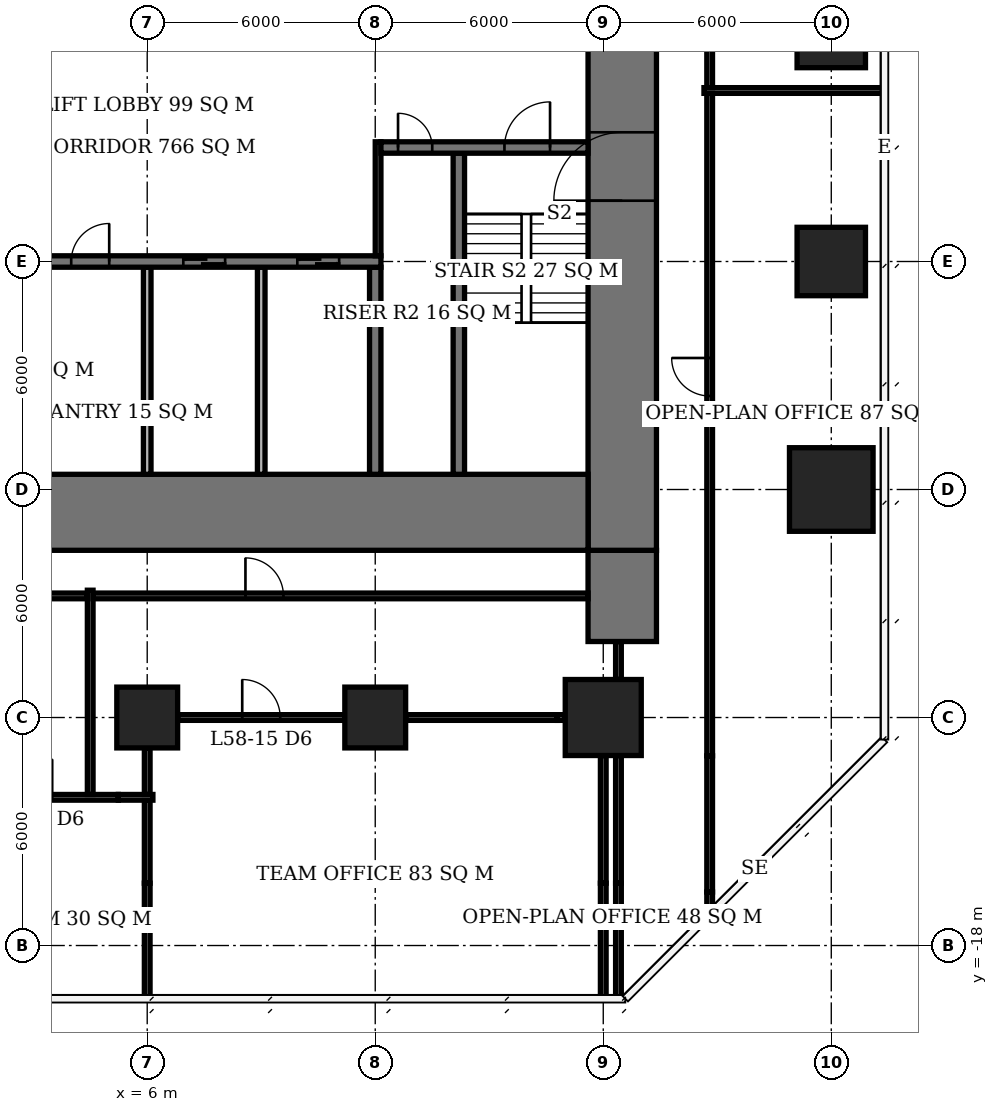
"""IFC4 building model, lengths in metres.
Left out: names, types, materials, properties, quantities, classifications, styles, units other than length and angle.
Written with IfcOpenShell. Run it as: python <this file> out.ifc"""

import sys

from ifc_helpers import new_model, si_unit, direction, frame, frame_2d, origin, origin_2d, place, context, subcontext, project, spatial, rectangle, extrude, element, fill, save


model = new_model("IFC4")
c1 = context("Model", 3, precision=1e-05, world=origin(), true_north=direction((0.0, 1.0)))
c2 = subcontext(c1, "Body", "Model", "MODEL_VIEW")
j1 = project(units=[si_unit("LENGTHUNIT", "METRE"), si_unit("PLANEANGLEUNIT", "RADIAN")], contexts=[c1])
p1 = place(None, origin())
s1 = spatial("IfcSite", under=j1, at=p1, CompositionType="ELEMENT")
p2 = place(p1, origin())
s2 = spatial("IfcBuilding", under=s1, at=p2, CompositionType="ELEMENT")
p3 = place(p2, frame((0.0, 0.0, 235.7)))
s3 = spatial("IfcBuildingStorey", under=s2, at=p3, CompositionType="ELEMENT", Elevation=235.7)
for number, where, z_axis, x_axis in (
    (1, (6.0, -12.0, 0.0), (0.0, 0.0, 1.0), (1.0, 0.0, 0.0)),
    (2, (12.0, -12.0, 0.0), (0.0, 0.0, 1.0), (1.0, 0.0, 0.0)),
):
    element("IfcColumn", number, at=place(p3, frame(where, z_axis=z_axis, x_axis=x_axis)), inside=s3, PredefinedType="COLUMN", context=c2, shape_type="SweptSolid", body=[
        extrude(rectangle(XDim=1.6, YDim=1.6, at=origin_2d()), origin(), (0.0, 0.0, 1.0), 3.9),
    ])
p4 = place(p3, frame((18.0, -12.0, 0.0), z_axis=(0.0, 0.0, 1.0), x_axis=(1.0, 0.0, 0.0)))
e3 = element("IfcColumn", 3, at=p4, inside=s3, PredefinedType="COLUMN", context=c2, shape_type="SweptSolid", body=[
    extrude(rectangle(XDim=2.0, YDim=2.0, at=origin_2d()), origin(), (0.0, 0.0, 1.0), 3.9),
])
p5 = place(p3, frame((24.0, -6.0, 0.0), z_axis=(0.0, 0.0, 1.0), x_axis=(1.0, 0.0, 0.0)))
e4 = element("IfcColumn", 4, at=p5, inside=s3, PredefinedType="COLUMN", context=c2, shape_type="SweptSolid", body=[
    extrude(rectangle(XDim=2.2, YDim=2.2, at=origin_2d()), origin(), (0.0, 0.0, 1.0), 3.9),
])
for number, where, z_axis, x_axis in (
    (5, (24.0, 0.0, 0.0), (0.0, 0.0, 1.0), (1.0, 0.0, 0.0)),
    (6, (24.0, 6.0, 0.0), (0.0, 0.0, 1.0), (1.0, 0.0, 0.0)),
):
    element("IfcColumn", number, at=place(p3, frame(where, z_axis=z_axis, x_axis=x_axis)), inside=s3, PredefinedType="COLUMN", context=c2, shape_type="SweptSolid", body=[
        extrude(rectangle(XDim=1.8, YDim=1.8, at=origin_2d()), origin(), (0.0, 0.0, 1.0), 3.9),
    ])
p6 = place(p3, frame((-5.6, -6.6, 0.0), z_axis=(0.0, 0.0, 1.0), x_axis=(1.0, 0.0, 0.0)))
e7 = element("IfcWall", 7, at=p6, inside=s3, PredefinedType="SHEAR", context=c2, shape_type="SweptSolid", body=[
    extrude(rectangle(XDim=23.2, YDim=2.0, at=frame_2d((11.6, 0.0))), origin(), (0.0, 0.0, 1.0), 3.9),
])
p7 = place(p3, frame((18.5, -7.6, 0.0), z_axis=(0.0, 0.0, 1.0), x_axis=(0.0, 1.0, 0.0)))
e8 = element("IfcWall", 8, at=p7, inside=s3, PredefinedType="SHEAR", context=c2, shape_type="SweptSolid", body=[
    extrude(rectangle(XDim=21.2, YDim=1.8, at=frame_2d((10.6, 0.0))), origin(), (0.0, 0.0, 1.0), 3.9),
])
p8 = place(p7, frame((9.2, 0.0, 0.0)))
e9 = element("IfcOpeningElement", 9, at=p8, cuts=e8, PredefinedType="OPENING", context=c2, shape_type="SweptSolid", body=[
    extrude(rectangle(XDim=1.8, YDim=2.4, at=frame_2d((0.9, 1.2))), frame((0.0, 0.91, 0.0), z_axis=(0.0, -1.0, 0.0), x_axis=(1.0, 0.0, 0.0)), (0.0, 0.0, 1.0), 1.82),
])
p9 = place(p3, frame((18.5, -10.0, 0.0), z_axis=(0.0, 0.0, 1.0), x_axis=(0.0, 1.0, 0.0)))
e10 = element("IfcWall", 10, at=p9, inside=s3, PredefinedType="SHEAR", context=c2, shape_type="SweptSolid", body=[
    extrude(rectangle(XDim=2.4, YDim=1.8, at=frame_2d((1.2, 0.0))), origin(), (0.0, 0.0, 1.0), 3.9),
])
p10 = place(p3, frame((-5.6, 0.0, 0.0), z_axis=(0.0, 0.0, 1.0), x_axis=(1.0, 0.0, 0.0)))
e11 = element("IfcWall", 11, at=p10, inside=s3, PredefinedType="SHEAR", context=c2, shape_type="SweptSolid", body=[
    extrude(rectangle(XDim=17.75, YDim=0.3, at=frame_2d((8.875, 0.0))), origin(), (0.0, 0.0, 1.0), 3.9),
])
p11 = place(p10, frame((0.6, 0.0, 0.0)))
e12 = element("IfcOpeningElement", 12, at=p11, cuts=e11, PredefinedType="OPENING", context=c2, shape_type="SweptSolid", body=[
    extrude(rectangle(XDim=0.9, YDim=2.1, at=frame_2d((0.45, 1.05))), frame((0.0, 0.16, 0.0), z_axis=(0.0, -1.0, 0.0), x_axis=(1.0, 0.0, 0.0)), (0.0, 0.0, 1.0), 0.32),
])
p12 = place(p10, frame((3.7, 0.0, 0.0)))
e13 = element("IfcOpeningElement", 13, at=p12, cuts=e11, PredefinedType="OPENING", context=c2, shape_type="SweptSolid", body=[
    extrude(rectangle(XDim=1.0, YDim=2.1, at=frame_2d((0.5, 1.05))), frame((0.0, 0.16, 0.0), z_axis=(0.0, -1.0, 0.0), x_axis=(1.0, 0.0, 0.0)), (0.0, 0.0, 1.0), 0.32),
])
p13 = place(p10, frame((9.6, 0.0, 0.0)))
e14 = element("IfcOpeningElement", 14, at=p13, cuts=e11, PredefinedType="OPENING", context=c2, shape_type="SweptSolid", body=[
    extrude(rectangle(XDim=1.0, YDim=2.1, at=frame_2d((0.5, 1.05))), frame((0.0, 0.16, 0.0), z_axis=(0.0, -1.0, 0.0), x_axis=(1.0, 0.0, 0.0)), (0.0, 0.0, 1.0), 0.32),
])
p14 = place(p10, frame((12.55, 0.0, 0.0)))
e15 = element("IfcOpeningElement", 15, at=p14, cuts=e11, PredefinedType="OPENING", context=c2, shape_type="SweptSolid", body=[
    extrude(rectangle(XDim=1.1, YDim=2.1, at=frame_2d((0.55, 1.05))), frame((0.0, 0.16, 0.0), z_axis=(0.0, -1.0, 0.0), x_axis=(1.0, 0.0, 0.0)), (0.0, 0.0, 1.0), 0.32),
])
p15 = place(p10, frame((15.55, 0.0, 0.0)))
e16 = element("IfcOpeningElement", 16, at=p15, cuts=e11, PredefinedType="OPENING", context=c2, shape_type="SweptSolid", body=[
    extrude(rectangle(XDim=1.1, YDim=2.1, at=frame_2d((0.55, 1.05))), frame((0.0, 0.16, 0.0), z_axis=(0.0, -1.0, 0.0), x_axis=(1.0, 0.0, 0.0)), (0.0, 0.0, 1.0), 0.32),
])
p16 = place(p3, frame((12.15, 3.0, 0.0), z_axis=(0.0, 0.0, 1.0), x_axis=(1.0, 0.0, 0.0)))
e17 = element("IfcWall", 17, at=p16, inside=s3, PredefinedType="SHEAR", context=c2, shape_type="SweptSolid", body=[
    extrude(rectangle(XDim=5.45, YDim=0.3, at=frame_2d((2.725, 0.0))), origin(), (0.0, 0.0, 1.0), 3.9),
])
p17 = place(p16, frame((3.25, 0.0, 0.0)))
e18 = element("IfcOpeningElement", 18, at=p17, cuts=e17, PredefinedType="OPENING", context=c2, shape_type="SweptSolid", body=[
    extrude(rectangle(XDim=1.2, YDim=2.1, at=frame_2d((0.6, 1.05))), frame((0.0, 0.16, 0.0), z_axis=(0.0, -1.0, 0.0), x_axis=(1.0, 0.0, 0.0)), (0.0, 0.0, 1.0), 0.32),
])
p18 = place(p16, frame((0.45, 0.0, 0.0)))
e19 = element("IfcOpeningElement", 19, at=p18, cuts=e17, PredefinedType="OPENING", context=c2, shape_type="SweptSolid", body=[
    extrude(rectangle(XDim=0.9, YDim=2.1, at=frame_2d((0.45, 1.05))), frame((0.0, 0.16, 0.0), z_axis=(0.0, -1.0, 0.0), x_axis=(1.0, 0.0, 0.0)), (0.0, 0.0, 1.0), 0.32),
])
p19 = place(p3, frame((12.0, -5.6, 0.0), z_axis=(0.0, 0.0, 1.0), x_axis=(0.0, 1.0, 0.0)))
e20 = element("IfcWall", 20, at=p19, inside=s3, PredefinedType="SHEAR", context=c2, shape_type="SweptSolid", body=[
    extrude(rectangle(XDim=5.45, YDim=0.3, at=frame_2d((2.725, 0.0))), origin(), (0.0, 0.0, 1.0), 3.9),
])
p20 = place(p3, frame((14.2, -5.6, 0.0), z_axis=(0.0, 0.0, 1.0), x_axis=(0.0, 1.0, 0.0)))
e21 = element("IfcWall", 21, at=p20, inside=s3, PredefinedType="SHEAR", context=c2, shape_type="SweptSolid", body=[
    extrude(rectangle(XDim=8.45, YDim=0.3, at=frame_2d((4.225, 0.0))), origin(), (0.0, 0.0, 1.0), 3.9),
])
for number, where, z_axis, x_axis in (
    (22, (6.0, -5.6, 0.0), (0.0, 0.0, 1.0), (0.0, 1.0, 0.0)),
    (23, (9.0, -5.6, 0.0), (0.0, 0.0, 1.0), (0.0, 1.0, 0.0)),
):
    element("IfcWall", number, at=place(p3, frame(where, z_axis=z_axis, x_axis=x_axis)), inside=s3, PredefinedType="SOLIDWALL", context=c2, shape_type="SweptSolid", body=[
        extrude(rectangle(XDim=5.45, YDim=0.2, at=frame_2d((2.725, 0.0))), origin(), (0.0, 0.0, 1.0), 3.9),
    ])
p21 = place(p3, frame((0.76, -14.1, 0.0), z_axis=(0.0, 0.0, 1.0), x_axis=(1.0, 0.0, 0.0)))
e24 = element("IfcWall", 24, at=p21, inside=s3, PredefinedType="PARTITIONING", context=c2, shape_type="SweptSolid", body=[
    extrude(rectangle(XDim=4.48, YDim=0.15, at=frame_2d((2.24, 0.0))), origin(), (0.0, 0.0, 1.0), 3.65),
])
p22 = place(p21, frame((1.74, 0.0, 0.0)))
e25 = element("IfcOpeningElement", 25, at=p22, cuts=e24, PredefinedType="OPENING", context=c2, shape_type="SweptSolid", body=[
    extrude(rectangle(XDim=1.0, YDim=2.1, at=frame_2d((0.5, 1.05))), frame((0.0, 0.085, 0.0), z_axis=(0.0, -1.0, 0.0), x_axis=(1.0, 0.0, 0.0)), (0.0, 0.0, 1.0), 0.17),
])
p23 = place(p3, frame((5.24, -14.1, 0.0), z_axis=(0.0, 0.0, 1.0), x_axis=(1.0, 0.0, 0.0)))
e26 = element("IfcWall", 26, at=p23, inside=s3, PredefinedType="PARTITIONING", context=c2, shape_type="SweptSolid", body=[
    extrude(rectangle(XDim=0.91, YDim=0.15, at=frame_2d((0.455, 0.0))), origin(), (0.0, 0.0, 1.0), 2.15),
])
p24 = place(p3, frame((6.8, -12.0, 0.0), z_axis=(0.0, 0.0, 1.0), x_axis=(1.0, 0.0, 0.0)))
e27 = element("IfcWall", 27, at=p24, inside=s3, PredefinedType="PARTITIONING", context=c2, shape_type="SweptSolid", body=[
    extrude(rectangle(XDim=4.4, YDim=0.15, at=frame_2d((2.2, 0.0))), origin(), (0.0, 0.0, 1.0), 3.65),
])
p25 = place(p24, frame((1.7, 0.0, 0.0)))
e28 = element("IfcOpeningElement", 28, at=p25, cuts=e27, PredefinedType="OPENING", context=c2, shape_type="SweptSolid", body=[
    extrude(rectangle(XDim=1.0, YDim=2.1, at=frame_2d((0.5, 1.05))), frame((0.0, 0.085, 0.0), z_axis=(0.0, -1.0, 0.0), x_axis=(1.0, 0.0, 0.0)), (0.0, 0.0, 1.0), 0.17),
])
p26 = place(p3, frame((12.8, -12.0, 0.0), z_axis=(0.0, 0.0, 1.0), x_axis=(1.0, 0.0, 0.0)))
e29 = element("IfcWall", 29, at=p26, inside=s3, PredefinedType="PARTITIONING", context=c2, shape_type="SweptSolid", body=[
    extrude(rectangle(XDim=3.99, YDim=0.15, at=frame_2d((1.995, 0.0))), origin(), (0.0, 0.0, 1.0), 3.65),
])
p27 = place(p3, frame((16.79, -12.0, 0.0), z_axis=(0.0, 0.0, 1.0), x_axis=(1.0, 0.0, 0.0)))
e30 = element("IfcWall", 30, at=p27, inside=s3, PredefinedType="PARTITIONING", context=c2, shape_type="SweptSolid", body=[
    extrude(rectangle(XDim=0.21, YDim=0.15, at=frame_2d((0.105, 0.0))), origin(), (0.0, 0.0, 1.0), 2.15),
])
p28 = place(p3, frame((6.0, -19.35, 0.0), z_axis=(0.0, 0.0, 1.0), x_axis=(0.0, 1.0, 0.0)))
e31 = element("IfcWall", 31, at=p28, inside=s3, PredefinedType="PARTITIONING", context=c2, shape_type="SweptSolid", body=[
    extrude(rectangle(XDim=2.99, YDim=0.15, at=frame_2d((1.495, 0.0))), origin(), (0.0, 0.0, 1.0), 3.65),
])
p29 = place(p3, frame((6.0, -16.36, 0.0), z_axis=(0.0, 0.0, 1.0), x_axis=(0.0, 1.0, 0.0)))
e32 = element("IfcWall", 32, at=p29, inside=s3, PredefinedType="PARTITIONING", context=c2, shape_type="SweptSolid", body=[
    extrude(rectangle(XDim=2.185, YDim=0.15, at=frame_2d((1.093, 0.0))), origin(), (0.0, 0.0, 1.0), 2.15),
])
p30 = place(p3, frame((6.0, -14.025, 0.0), z_axis=(0.0, 0.0, 1.0), x_axis=(0.0, 1.0, 0.0)))
e33 = element("IfcWall", 33, at=p30, inside=s3, PredefinedType="PARTITIONING", context=c2, shape_type="SweptSolid", body=[
    extrude(rectangle(XDim=1.225, YDim=0.15, at=frame_2d((0.612, 0.0))), origin(), (0.0, 0.0, 1.0), 2.15),
])
p31 = place(p3, frame((18.0, -19.4, 0.0), z_axis=(0.0, 0.0, 1.0), x_axis=(0.0, 1.0, 0.0)))
e34 = element("IfcWall", 34, at=p31, inside=s3, PredefinedType="PARTITIONING", context=c2, shape_type="SweptSolid", body=[
    extrude(rectangle(XDim=3.04, YDim=0.15, at=frame_2d((1.52, 0.0))), origin(), (0.0, 0.0, 1.0), 3.65),
])
p32 = place(p3, frame((18.0, -16.36, 0.0), z_axis=(0.0, 0.0, 1.0), x_axis=(0.0, 1.0, 0.0)))
e35 = element("IfcWall", 35, at=p32, inside=s3, PredefinedType="PARTITIONING", context=c2, shape_type="SweptSolid", body=[
    extrude(rectangle(XDim=3.36, YDim=0.15, at=frame_2d((1.68, 0.0))), origin(), (0.0, 0.0, 1.0), 2.15),
])
p33 = place(p3, frame((-5.6, -8.8, 0.0), z_axis=(0.0, 0.0, 1.0), x_axis=(1.0, 0.0, 0.0)))
e36 = element("IfcWall", 36, at=p33, inside=s3, PredefinedType="PARTITIONING", context=c2, shape_type="SweptSolid", body=[
    extrude(rectangle(XDim=10.025, YDim=0.15, at=frame_2d((5.013, 0.0))), origin(), (0.0, 0.0, 1.0), 3.65),
])
p34 = place(p33, frame((3.035, 0.0, 0.0)))
e37 = element("IfcOpeningElement", 37, at=p34, cuts=e36, PredefinedType="OPENING", context=c2, shape_type="SweptSolid", body=[
    extrude(rectangle(XDim=1.0, YDim=2.1, at=frame_2d((0.5, 1.05))), frame((0.0, 0.085, 0.0), z_axis=(0.0, -1.0, 0.0), x_axis=(1.0, 0.0, 0.0)), (0.0, 0.0, 1.0), 0.17),
])
p35 = place(p3, frame((4.5, -14.025, 0.0), z_axis=(0.0, 0.0, 1.0), x_axis=(0.0, 1.0, 0.0)))
e38 = element("IfcWall", 38, at=p35, inside=s3, PredefinedType="PARTITIONING", context=c2, shape_type="SweptSolid", body=[
    extrude(rectangle(XDim=5.375, YDim=0.15, at=frame_2d((2.688, 0.0))), origin(), (0.0, 0.0, 1.0), 3.65),
])
p36 = place(p3, frame((4.575, -8.8, 0.0), z_axis=(0.0, 0.0, 1.0), x_axis=(1.0, 0.0, 0.0)))
e39 = element("IfcWall", 39, at=p36, inside=s3, PredefinedType="PARTITIONING", context=c2, shape_type="SweptSolid", body=[
    extrude(rectangle(XDim=13.025, YDim=0.15, at=frame_2d((6.513, 0.0))), origin(), (0.0, 0.0, 1.0), 3.65),
])
p37 = place(p36, frame((4.01, 0.0, 0.0)))
e40 = element("IfcOpeningElement", 40, at=p37, cuts=e39, PredefinedType="OPENING", context=c2, shape_type="SweptSolid", body=[
    extrude(rectangle(XDim=1.0, YDim=2.1, at=frame_2d((0.5, 1.05))), frame((0.0, 0.085, 0.0), z_axis=(0.0, -1.0, 0.0), x_axis=(1.0, 0.0, 0.0)), (0.0, 0.0, 1.0), 0.17),
])
p38 = place(p3, frame((18.4, -19.4, 0.0), z_axis=(0.0, 0.0, 1.0), x_axis=(0.0, 1.0, 0.0)))
e41 = element("IfcWall", 41, at=p38, inside=s3, PredefinedType="PARTITIONING", context=c2, shape_type="SweptSolid", body=[
    extrude(rectangle(XDim=3.04, YDim=0.15, at=frame_2d((1.52, 0.0))), origin(), (0.0, 0.0, 1.0), 3.65),
])
p39 = place(p3, frame((18.4, -16.36, 0.0), z_axis=(0.0, 0.0, 1.0), x_axis=(0.0, 1.0, 0.0)))
e42 = element("IfcWall", 42, at=p39, inside=s3, PredefinedType="PARTITIONING", context=c2, shape_type="SweptSolid", body=[
    extrude(rectangle(XDim=3.36, YDim=0.15, at=frame_2d((1.68, 0.0))), origin(), (0.0, 0.0, 1.0), 2.15),
])
p40 = place(p3, frame((18.4, -11.0, 0.0), z_axis=(0.0, 0.0, 1.0), x_axis=(0.0, 1.0, 0.0)))
e43 = element("IfcWall", 43, at=p40, inside=s3, PredefinedType="PARTITIONING", context=c2, shape_type="SweptSolid", body=[
    extrude(rectangle(XDim=1.0, YDim=0.15, at=frame_2d((0.5, 0.0))), origin(), (0.0, 0.0, 1.0), 3.65),
])
p41 = place(p3, frame((20.8, -17.064, 0.0), z_axis=(0.0, 0.0, 1.0), x_axis=(0.0, 1.0, 0.0)))
e44 = element("IfcWall", 44, at=p41, inside=s3, PredefinedType="PARTITIONING", context=c2, shape_type="SweptSolid", body=[
    extrude(rectangle(XDim=0.472, YDim=0.15, at=frame_2d((0.236, 0.0))), origin(), (0.0, 0.0, 1.0), 3.65),
])
p42 = place(p3, frame((20.8, -16.592, 0.0), z_axis=(0.0, 0.0, 1.0), x_axis=(0.0, 1.0, 0.0)))
e45 = element("IfcWall", 45, at=p42, inside=s3, PredefinedType="PARTITIONING", context=c2, shape_type="SweptSolid", body=[
    extrude(rectangle(XDim=3.584, YDim=0.15, at=frame_2d((1.792, 0.0))), origin(), (0.0, 0.0, 1.0), 2.15),
])
p43 = place(p3, frame((20.8, -13.008, 0.0), z_axis=(0.0, 0.0, 1.0), x_axis=(0.0, 1.0, 0.0)))
e46 = element("IfcWall", 46, at=p43, inside=s3, PredefinedType="PARTITIONING", context=c2, shape_type="SweptSolid", body=[
    extrude(rectangle(XDim=17.433, YDim=0.15, at=frame_2d((8.716, 0.0))), origin(), (0.0, 0.0, 1.0), 3.65),
])
p44 = place(p43, frame((9.469, 0.0, 0.0)))
e47 = element("IfcOpeningElement", 47, at=p44, cuts=e46, PredefinedType="OPENING", context=c2, shape_type="SweptSolid", body=[
    extrude(rectangle(XDim=1.0, YDim=2.1, at=frame_2d((0.5, 1.05))), frame((0.0, 0.085, 0.0), z_axis=(0.0, -1.0, 0.0), x_axis=(1.0, 0.0, 0.0)), (0.0, 0.0, 1.0), 0.17),
])
p45 = place(p3, frame((20.8, 4.575, 0.0), z_axis=(0.0, 0.0, 1.0), x_axis=(0.0, 1.0, 0.0)))
e48 = element("IfcWall", 48, at=p45, inside=s3, PredefinedType="PARTITIONING", context=c2, shape_type="SweptSolid", body=[
    extrude(rectangle(XDim=18.489, YDim=0.15, at=frame_2d((9.245, 0.0))), origin(), (0.0, 0.0, 1.0), 3.65),
])
p46 = place(p45, frame((11.475, 0.0, 0.0)))
e49 = element("IfcOpeningElement", 49, at=p46, cuts=e48, PredefinedType="OPENING", context=c2, shape_type="SweptSolid", body=[
    extrude(rectangle(XDim=1.0, YDim=2.1, at=frame_2d((0.5, 1.05))), frame((0.0, 0.085, 0.0), z_axis=(0.0, -1.0, 0.0), x_axis=(1.0, 0.0, 0.0)), (0.0, 0.0, 1.0), 0.17),
])
p47 = place(p3, frame((20.65, 4.5, 0.0), z_axis=(0.0, 0.0, 1.0), x_axis=(1.0, 0.0, 0.0)))
e50 = element("IfcWall", 50, at=p47, inside=s3, PredefinedType="PARTITIONING", context=c2, shape_type="SweptSolid", body=[
    extrude(rectangle(XDim=4.75, YDim=0.15, at=frame_2d((2.375, 0.0))), origin(), (0.0, 0.0, 1.0), 3.65),
])
p48 = place(p3, frame((12.075, 0.15, 0.0), z_axis=(0.0, 0.0, 1.0), x_axis=(0.0, 1.0, 0.0)))
e51 = element("IfcWall", 51, at=p48, inside=s3, PredefinedType="PARTITIONING", context=c2, shape_type="SweptSolid", body=[
    extrude(rectangle(XDim=3.0, YDim=0.15, at=frame_2d((1.5, 0.0))), origin(), (0.0, 0.0, 1.0), 3.65),
])
p49 = place(p8, origin())
e52 = element("IfcDoor", 52, at=p49, inside=s3, OperationType="DOUBLE_DOOR_SINGLE_SWING", PredefinedType="DOOR", context=c2, shape_type="SweptSolid", body=[
    extrude(rectangle(XDim=1.8, YDim=2.4, at=frame_2d((0.9, 1.2))), frame((0.0, 0.025, 0.0), z_axis=(0.0, -1.0, 0.0), x_axis=(1.0, 0.0, 0.0)), (0.0, 0.0, 1.0), 0.05),
])
fill(e9, e52)
p50 = place(p17, origin())
e53 = element("IfcDoor", 53, at=p50, inside=s3, OperationType="SINGLE_SWING_RIGHT", PredefinedType="DOOR", context=c2, shape_type="SweptSolid", body=[
    extrude(rectangle(XDim=1.2, YDim=2.1, at=frame_2d((0.6, 1.05))), frame((0.0, 0.025, 0.0), z_axis=(0.0, -1.0, 0.0), x_axis=(1.0, 0.0, 0.0)), (0.0, 0.0, 1.0), 0.05),
])
fill(e18, e53)
p51 = place(p18, origin())
e54 = element("IfcDoor", 54, at=p51, inside=s3, OperationType="SINGLE_SWING_LEFT", PredefinedType="DOOR", context=c2, shape_type="SweptSolid", body=[
    extrude(rectangle(XDim=0.9, YDim=2.1, at=frame_2d((0.45, 1.05))), frame((0.0, 0.025, 0.0), z_axis=(0.0, -1.0, 0.0), x_axis=(1.0, 0.0, 0.0)), (0.0, 0.0, 1.0), 0.05),
])
fill(e19, e54)
p52 = place(p13, origin())
e55 = element("IfcDoor", 55, at=p52, inside=s3, OperationType="SINGLE_SWING_RIGHT", PredefinedType="DOOR", context=c2, shape_type="SweptSolid", body=[
    extrude(rectangle(XDim=1.0, YDim=2.1, at=frame_2d((0.5, 1.05))), frame((0.0, 0.025, 0.0), z_axis=(0.0, -1.0, 0.0), x_axis=(1.0, 0.0, 0.0)), (0.0, 0.0, 1.0), 0.05),
])
fill(e14, e55)
p53 = place(p14, origin())
e56 = element("IfcDoor", 56, at=p53, inside=s3, OperationType="DOUBLE_DOOR_SLIDING", PredefinedType="USERDEFINED", context=c2, shape_type="SweptSolid", body=[
    extrude(rectangle(XDim=1.1, YDim=2.1, at=frame_2d((0.55, 1.05))), frame((0.0, 0.025, 0.0), z_axis=(0.0, -1.0, 0.0), x_axis=(1.0, 0.0, 0.0)), (0.0, 0.0, 1.0), 0.05),
])
fill(e15, e56)
p54 = place(p15, origin())
e57 = element("IfcDoor", 57, at=p54, inside=s3, OperationType="DOUBLE_DOOR_SLIDING", PredefinedType="USERDEFINED", context=c2, shape_type="SweptSolid", body=[
    extrude(rectangle(XDim=1.1, YDim=2.1, at=frame_2d((0.55, 1.05))), frame((0.0, 0.025, 0.0), z_axis=(0.0, -1.0, 0.0), x_axis=(1.0, 0.0, 0.0)), (0.0, 0.0, 1.0), 0.05),
])
fill(e16, e57)
p55 = place(p25, origin())
e58 = element("IfcDoor", 58, at=p55, inside=s3, OperationType="SINGLE_SWING_LEFT", PredefinedType="DOOR", context=c2, shape_type="SweptSolid", body=[
    extrude(rectangle(XDim=1.0, YDim=2.1, at=frame_2d((0.5, 1.05))), frame((0.0, 0.025, 0.0), z_axis=(0.0, -1.0, 0.0), x_axis=(1.0, 0.0, 0.0)), (0.0, 0.0, 1.0), 0.05),
])
fill(e28, e58)
p56 = place(p37, origin())
e59 = element("IfcDoor", 59, at=p56, inside=s3, OperationType="SINGLE_SWING_LEFT", PredefinedType="DOOR", context=c2, shape_type="SweptSolid", body=[
    extrude(rectangle(XDim=1.0, YDim=2.1, at=frame_2d((0.5, 1.05))), frame((0.0, 0.025, 0.0), z_axis=(0.0, -1.0, 0.0), x_axis=(1.0, 0.0, 0.0)), (0.0, 0.0, 1.0), 0.05),
])
fill(e40, e59)
p57 = place(p44, origin())
e60 = element("IfcDoor", 60, at=p57, inside=s3, OperationType="SINGLE_SWING_RIGHT", PredefinedType="DOOR", context=c2, shape_type="SweptSolid", body=[
    extrude(rectangle(XDim=1.0, YDim=2.1, at=frame_2d((0.5, 1.05))), frame((0.0, 0.025, 0.0), z_axis=(0.0, -1.0, 0.0), x_axis=(1.0, 0.0, 0.0)), (0.0, 0.0, 1.0), 0.05),
])
fill(e47, e60)
save(model, sys.argv[1])
